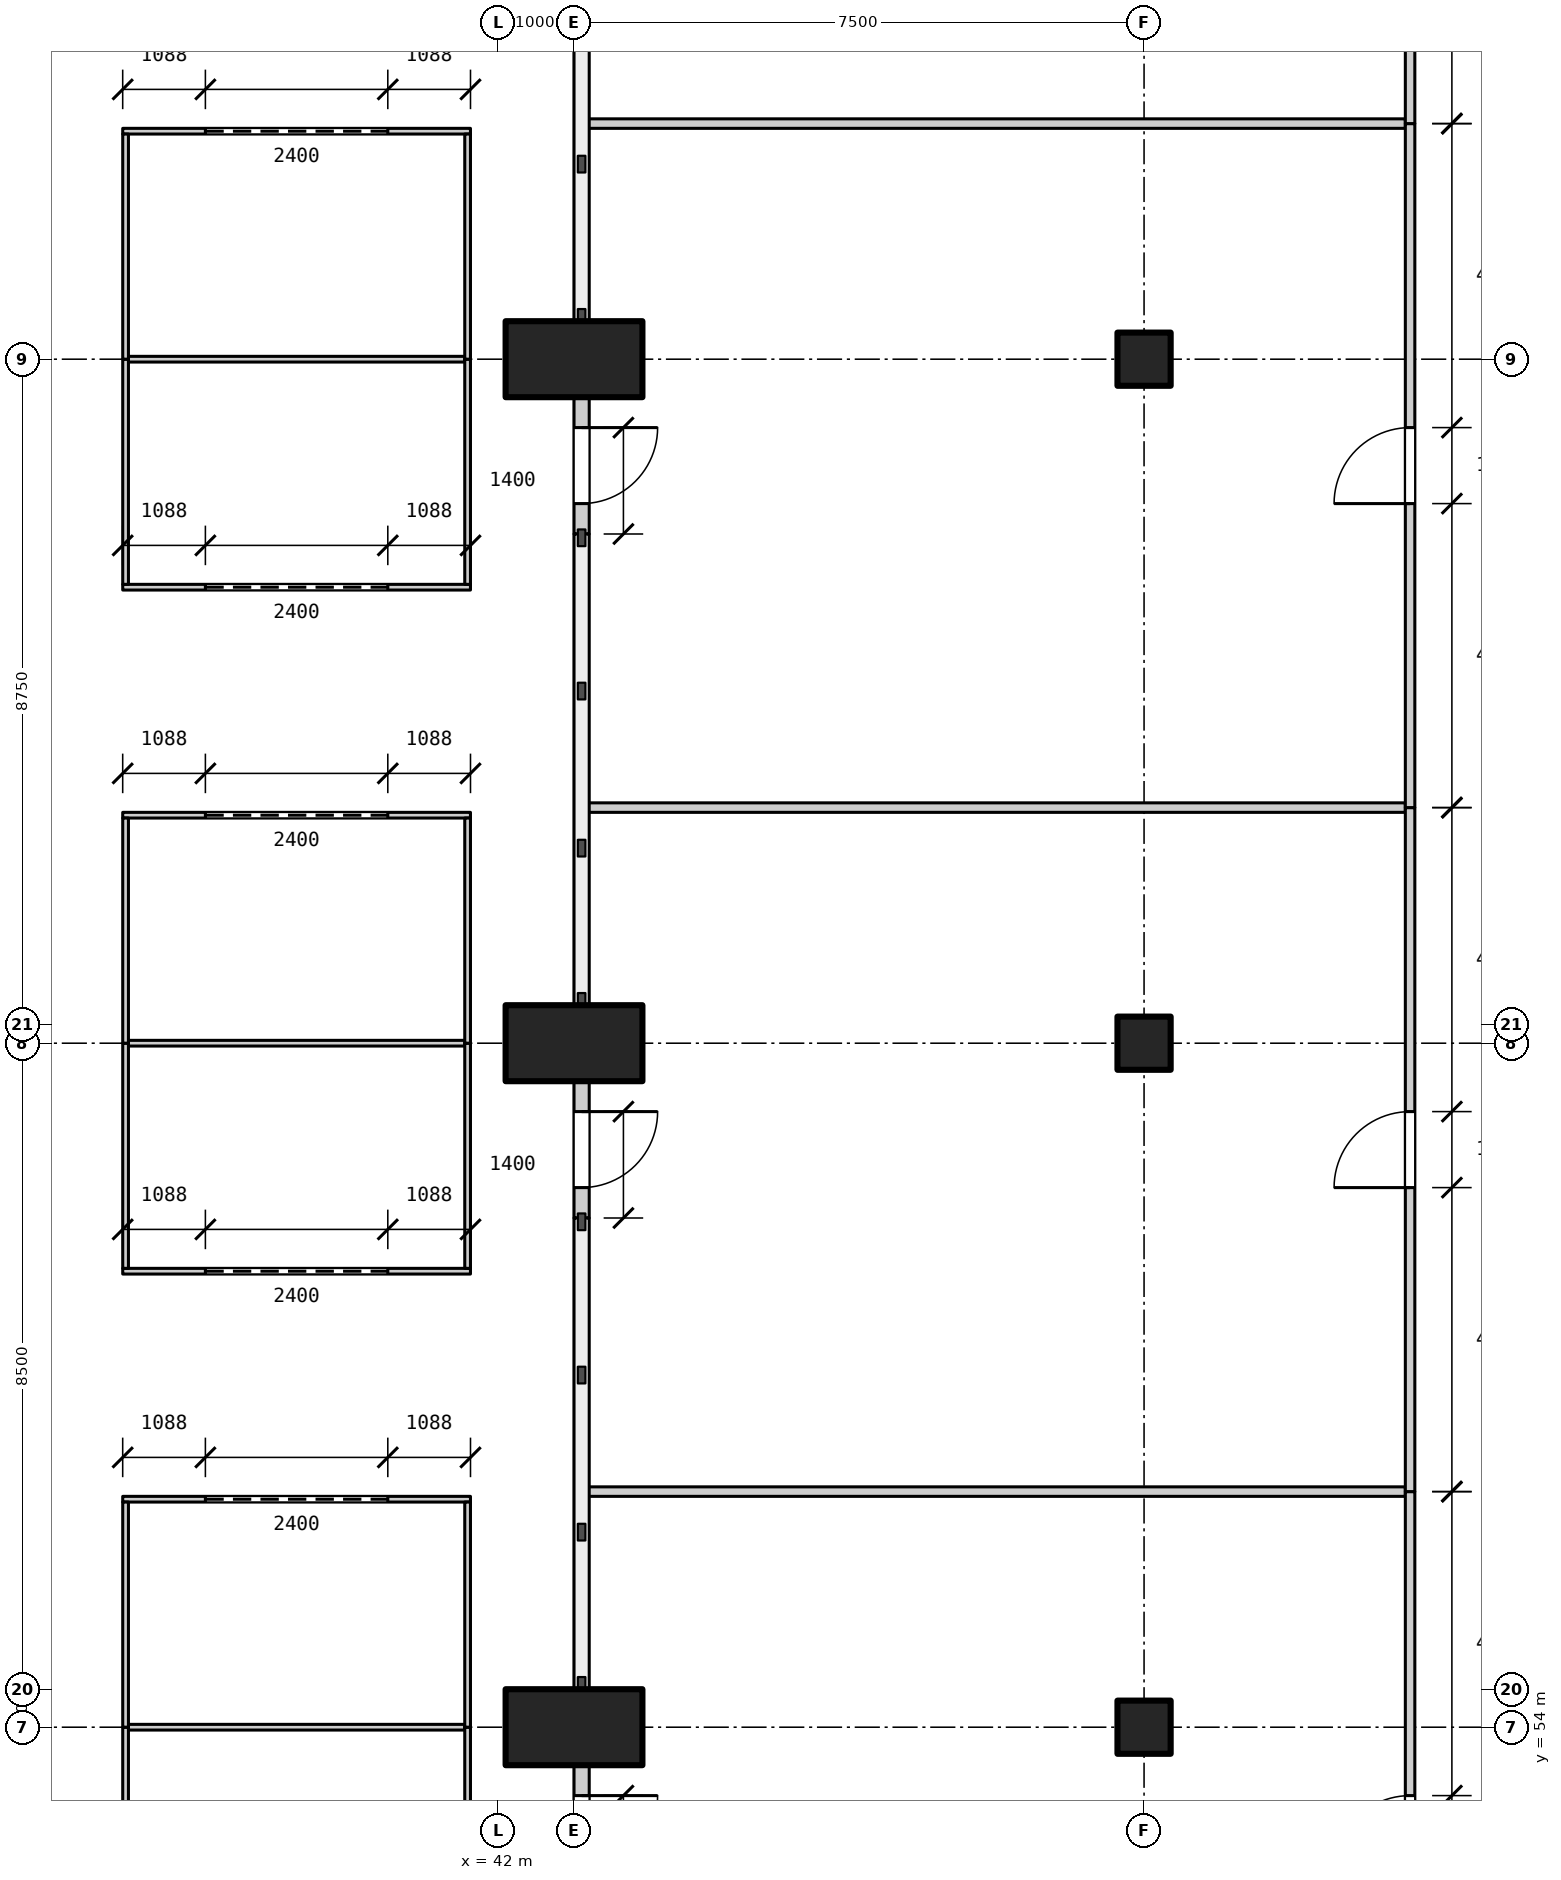
"""IFC4 building model, lengths in metres.
Left out: names, types, materials, properties, quantities, classifications, styles, units other than length and angle.
Written with IfcOpenShell. Run it as: python <this file> out.ifc"""

import sys

from ifc_helpers import new_model, si_unit, direction, frame, frame_2d, origin, origin_2d, place, context, subcontext, project, spatial, rectangle, extrude, element, fill, save


model = new_model("IFC4")
c1 = context("Model", 3, precision=1e-05, world=origin(), true_north=direction((0.0, 1.0)))
c2 = subcontext(c1, "Body", "Model", "MODEL_VIEW")
j1 = project(units=[si_unit("LENGTHUNIT", "METRE"), si_unit("PLANEANGLEUNIT", "RADIAN")], contexts=[c1])
p1 = place(None, origin())
s1 = spatial("IfcSite", under=j1, at=p1, CompositionType="ELEMENT")
p2 = place(p1, origin())
s2 = spatial("IfcBuilding", under=s1, at=p2, CompositionType="ELEMENT")
p3 = place(p2, origin())
s3 = spatial("IfcBuildingStorey", under=s2, at=p3, CompositionType="ELEMENT", Elevation=0.0)
for number, where, z_axis, x_axis in (
    (1, (50.5, 54.0, 0.0), (0.0, 0.0, 1.0), (1.0, 0.0, 0.0)),
    (2, (50.5, 63.0, 0.0), (0.0, 0.0, 1.0), (1.0, 0.0, 0.0)),
    (3, (50.5, 72.0, 0.0), (0.0, 0.0, 1.0), (1.0, 0.0, 0.0)),
):
    element("IfcColumn", number, at=place(p3, frame(where, z_axis=z_axis, x_axis=x_axis)), inside=s3, PredefinedType="COLUMN", context=c2, shape_type="SweptSolid", body=[
        extrude(rectangle(XDim=0.7, YDim=0.7, at=origin_2d()), origin(), (0.0, 0.0, 1.0), 6.0),
    ])
for number, where, z_axis, x_axis in (
    (4, (43.0, 54.0, 0.0), (0.0, 0.0, 1.0), (1.0, 0.0, 0.0)),
    (5, (43.0, 63.0, 0.0), (0.0, 0.0, 1.0), (1.0, 0.0, 0.0)),
    (6, (43.0, 72.0, 0.0), (0.0, 0.0, 1.0), (1.0, 0.0, 0.0)),
):
    element("IfcColumn", number, at=place(p3, frame(where, z_axis=z_axis, x_axis=x_axis)), inside=s3, PredefinedType="COLUMN", context=c2, shape_type="SweptSolid", body=[
        extrude(rectangle(XDim=1.8, YDim=1.0, at=origin_2d()), origin(), (0.0, 0.0, 1.0), 6.0),
    ])
p4 = place(p3, frame((43.1, 51.7, 0.0), z_axis=(0.0, 0.0, 1.0), x_axis=(0.0, 1.0, 0.0)))
e7 = element("IfcWall", 7, at=p4, inside=s3, PredefinedType="PARTITIONING", context=c2, shape_type="SweptSolid", body=[
    extrude(rectangle(XDim=1.8, YDim=0.2, at=frame_2d((0.9, 0.0))), origin(), (0.0, 0.0, 1.0), 5.8),
])
p5 = place(p4, frame((0.4, 0.0, 0.0)))
e8 = element("IfcOpeningElement", 8, at=p5, cuts=e7, PredefinedType="OPENING", context=c2, shape_type="SweptSolid", body=[
    extrude(rectangle(XDim=1.0, YDim=2.4, at=frame_2d((0.5, 1.2))), frame((0.0, 0.11, 0.0), z_axis=(0.0, -1.0, 0.0), x_axis=(1.0, 0.0, 0.0)), (0.0, 0.0, 1.0), 0.22),
])
p6 = place(p3, frame((43.1, 60.7, 0.0), z_axis=(0.0, 0.0, 1.0), x_axis=(0.0, 1.0, 0.0)))
e9 = element("IfcWall", 9, at=p6, inside=s3, PredefinedType="PARTITIONING", context=c2, shape_type="SweptSolid", body=[
    extrude(rectangle(XDim=1.8, YDim=0.2, at=frame_2d((0.9, 0.0))), origin(), (0.0, 0.0, 1.0), 5.8),
])
p7 = place(p6, frame((0.4, 0.0, 0.0)))
e10 = element("IfcOpeningElement", 10, at=p7, cuts=e9, PredefinedType="OPENING", context=c2, shape_type="SweptSolid", body=[
    extrude(rectangle(XDim=1.0, YDim=2.4, at=frame_2d((0.5, 1.2))), frame((0.0, 0.11, 0.0), z_axis=(0.0, -1.0, 0.0), x_axis=(1.0, 0.0, 0.0)), (0.0, 0.0, 1.0), 0.22),
])
p8 = place(p3, frame((43.1, 69.7, 0.0), z_axis=(0.0, 0.0, 1.0), x_axis=(0.0, 1.0, 0.0)))
e11 = element("IfcWall", 11, at=p8, inside=s3, PredefinedType="PARTITIONING", context=c2, shape_type="SweptSolid", body=[
    extrude(rectangle(XDim=1.8, YDim=0.2, at=frame_2d((0.9, 0.0))), origin(), (0.0, 0.0, 1.0), 5.8),
])
p9 = place(p8, frame((0.4, 0.0, 0.0)))
e12 = element("IfcOpeningElement", 12, at=p9, cuts=e11, PredefinedType="OPENING", context=c2, shape_type="SweptSolid", body=[
    extrude(rectangle(XDim=1.0, YDim=2.4, at=frame_2d((0.5, 1.2))), frame((0.0, 0.11, 0.0), z_axis=(0.0, -1.0, 0.0), x_axis=(1.0, 0.0, 0.0)), (0.0, 0.0, 1.0), 0.22),
])
p10 = place(p3, frame((37.137, 54.0, 0.0), z_axis=(0.0, 0.0, 1.0), x_axis=(1.0, 0.0, 0.0)))
e13 = element("IfcWall", 13, at=p10, inside=s3, PredefinedType="PARTITIONING", context=c2, shape_type="SweptSolid", body=[
    extrude(rectangle(XDim=4.425, YDim=0.075, at=frame_2d((2.212, 0.0))), origin(), (0.0, 0.0, 1.0), 3.0),
])
p11 = place(p3, frame((37.062, 57.0, 0.0), z_axis=(0.0, 0.0, 1.0), x_axis=(1.0, 0.0, 0.0)))
e14 = element("IfcWall", 14, at=p11, inside=s3, PredefinedType="PARTITIONING", context=c2, shape_type="SweptSolid", body=[
    extrude(rectangle(XDim=4.575, YDim=0.075, at=frame_2d((2.288, 0.0))), origin(), (0.0, 0.0, 1.0), 3.0),
])
p12 = place(p11, frame((1.087, 0.0, 0.0)))
e15 = element("IfcOpeningElement", 15, at=p12, cuts=e14, PredefinedType="OPENING", context=c2, shape_type="SweptSolid", body=[
    extrude(rectangle(XDim=2.4, YDim=2.4, at=frame_2d((1.2, 1.2))), frame((0.0, 0.047, 0.0), z_axis=(0.0, -1.0, 0.0), x_axis=(1.0, 0.0, 0.0)), (0.0, 0.0, 1.0), 0.095),
])
p13 = place(p3, frame((43.1, 57.1, 0.0), z_axis=(0.0, 0.0, 1.0), x_axis=(1.0, 0.0, 0.0)))
e16 = element("IfcWall", 16, at=p13, inside=s3, PredefinedType="PARTITIONING", context=c2, shape_type="SweptSolid", body=[
    extrude(rectangle(XDim=10.837, YDim=0.125, at=frame_2d((5.419, 0.0))), origin(), (0.0, 0.0, 1.0), 5.8),
])
p14 = place(p3, frame((37.062, 60.0, 0.0), z_axis=(0.0, 0.0, 1.0), x_axis=(1.0, 0.0, 0.0)))
e17 = element("IfcWall", 17, at=p14, inside=s3, PredefinedType="PARTITIONING", context=c2, shape_type="SweptSolid", body=[
    extrude(rectangle(XDim=4.575, YDim=0.075, at=frame_2d((2.288, 0.0))), origin(), (0.0, 0.0, 1.0), 3.0),
])
p15 = place(p14, frame((1.087, 0.0, 0.0)))
e18 = element("IfcOpeningElement", 18, at=p15, cuts=e17, PredefinedType="OPENING", context=c2, shape_type="SweptSolid", body=[
    extrude(rectangle(XDim=2.4, YDim=2.4, at=frame_2d((1.2, 1.2))), frame((0.0, 0.047, 0.0), z_axis=(0.0, -1.0, 0.0), x_axis=(1.0, 0.0, 0.0)), (0.0, 0.0, 1.0), 0.095),
])
p16 = place(p3, frame((37.137, 63.0, 0.0), z_axis=(0.0, 0.0, 1.0), x_axis=(1.0, 0.0, 0.0)))
e19 = element("IfcWall", 19, at=p16, inside=s3, PredefinedType="PARTITIONING", context=c2, shape_type="SweptSolid", body=[
    extrude(rectangle(XDim=4.425, YDim=0.075, at=frame_2d((2.212, 0.0))), origin(), (0.0, 0.0, 1.0), 3.0),
])
p17 = place(p3, frame((37.062, 66.0, 0.0), z_axis=(0.0, 0.0, 1.0), x_axis=(1.0, 0.0, 0.0)))
e20 = element("IfcWall", 20, at=p17, inside=s3, PredefinedType="PARTITIONING", context=c2, shape_type="SweptSolid", body=[
    extrude(rectangle(XDim=4.575, YDim=0.075, at=frame_2d((2.288, 0.0))), origin(), (0.0, 0.0, 1.0), 3.0),
])
p18 = place(p17, frame((1.087, 0.0, 0.0)))
e21 = element("IfcOpeningElement", 21, at=p18, cuts=e20, PredefinedType="OPENING", context=c2, shape_type="SweptSolid", body=[
    extrude(rectangle(XDim=2.4, YDim=2.4, at=frame_2d((1.2, 1.2))), frame((0.0, 0.047, 0.0), z_axis=(0.0, -1.0, 0.0), x_axis=(1.0, 0.0, 0.0)), (0.0, 0.0, 1.0), 0.095),
])
p19 = place(p3, frame((43.1, 66.1, 0.0), z_axis=(0.0, 0.0, 1.0), x_axis=(1.0, 0.0, 0.0)))
e22 = element("IfcWall", 22, at=p19, inside=s3, PredefinedType="PARTITIONING", context=c2, shape_type="SweptSolid", body=[
    extrude(rectangle(XDim=10.837, YDim=0.125, at=frame_2d((5.419, 0.0))), origin(), (0.0, 0.0, 1.0), 5.8),
])
p20 = place(p3, frame((37.062, 69.0, 0.0), z_axis=(0.0, 0.0, 1.0), x_axis=(1.0, 0.0, 0.0)))
e23 = element("IfcWall", 23, at=p20, inside=s3, PredefinedType="PARTITIONING", context=c2, shape_type="SweptSolid", body=[
    extrude(rectangle(XDim=4.575, YDim=0.075, at=frame_2d((2.288, 0.0))), origin(), (0.0, 0.0, 1.0), 3.0),
])
p21 = place(p20, frame((1.087, 0.0, 0.0)))
e24 = element("IfcOpeningElement", 24, at=p21, cuts=e23, PredefinedType="OPENING", context=c2, shape_type="SweptSolid", body=[
    extrude(rectangle(XDim=2.4, YDim=2.4, at=frame_2d((1.2, 1.2))), frame((0.0, 0.047, 0.0), z_axis=(0.0, -1.0, 0.0), x_axis=(1.0, 0.0, 0.0)), (0.0, 0.0, 1.0), 0.095),
])
p22 = place(p3, frame((37.137, 72.0, 0.0), z_axis=(0.0, 0.0, 1.0), x_axis=(1.0, 0.0, 0.0)))
e25 = element("IfcWall", 25, at=p22, inside=s3, PredefinedType="PARTITIONING", context=c2, shape_type="SweptSolid", body=[
    extrude(rectangle(XDim=4.425, YDim=0.075, at=frame_2d((2.212, 0.0))), origin(), (0.0, 0.0, 1.0), 3.0),
])
p23 = place(p3, frame((37.062, 75.0, 0.0), z_axis=(0.0, 0.0, 1.0), x_axis=(1.0, 0.0, 0.0)))
e26 = element("IfcWall", 26, at=p23, inside=s3, PredefinedType="PARTITIONING", context=c2, shape_type="SweptSolid", body=[
    extrude(rectangle(XDim=4.575, YDim=0.075, at=frame_2d((2.288, 0.0))), origin(), (0.0, 0.0, 1.0), 3.0),
])
p24 = place(p23, frame((1.087, 0.0, 0.0)))
e27 = element("IfcOpeningElement", 27, at=p24, cuts=e26, PredefinedType="OPENING", context=c2, shape_type="SweptSolid", body=[
    extrude(rectangle(XDim=2.4, YDim=2.4, at=frame_2d((1.2, 1.2))), frame((0.0, 0.047, 0.0), z_axis=(0.0, -1.0, 0.0), x_axis=(1.0, 0.0, 0.0)), (0.0, 0.0, 1.0), 0.095),
])
p25 = place(p3, frame((43.1, 75.1, 0.0), z_axis=(0.0, 0.0, 1.0), x_axis=(1.0, 0.0, 0.0)))
e28 = element("IfcWall", 28, at=p25, inside=s3, PredefinedType="PARTITIONING", context=c2, shape_type="SweptSolid", body=[
    extrude(rectangle(XDim=10.837, YDim=0.125, at=frame_2d((5.419, 0.0))), origin(), (0.0, 0.0, 1.0), 5.8),
])
for number, where, z_axis, x_axis in (
    (29, (37.1, 51.038, 0.0), (0.0, 0.0, 1.0), (0.0, 1.0, 0.0)),
    (30, (37.1, 54.0, 0.0), (0.0, 0.0, 1.0), (0.0, 1.0, 0.0)),
    (31, (37.1, 60.038, 0.0), (0.0, 0.0, 1.0), (0.0, 1.0, 0.0)),
    (32, (37.1, 63.0, 0.0), (0.0, 0.0, 1.0), (0.0, 1.0, 0.0)),
    (33, (37.1, 69.038, 0.0), (0.0, 0.0, 1.0), (0.0, 1.0, 0.0)),
    (34, (37.1, 72.0, 0.0), (0.0, 0.0, 1.0), (0.0, 1.0, 0.0)),
    (35, (41.6, 51.038, 0.0), (0.0, 0.0, 1.0), (0.0, 1.0, 0.0)),
    (36, (41.6, 54.0, 0.0), (0.0, 0.0, 1.0), (0.0, 1.0, 0.0)),
    (37, (41.6, 60.038, 0.0), (0.0, 0.0, 1.0), (0.0, 1.0, 0.0)),
    (38, (41.6, 63.0, 0.0), (0.0, 0.0, 1.0), (0.0, 1.0, 0.0)),
    (39, (41.6, 69.038, 0.0), (0.0, 0.0, 1.0), (0.0, 1.0, 0.0)),
    (40, (41.6, 72.0, 0.0), (0.0, 0.0, 1.0), (0.0, 1.0, 0.0)),
):
    element("IfcWall", number, at=place(p3, frame(where, z_axis=z_axis, x_axis=x_axis)), inside=s3, PredefinedType="PARTITIONING", context=c2, shape_type="SweptSolid", body=[
        extrude(rectangle(XDim=2.962, YDim=0.075, at=frame_2d((1.481, 0.0))), origin(), (0.0, 0.0, 1.0), 3.0),
    ])
p26 = place(p3, frame((54.0, 48.1, 0.0), z_axis=(0.0, 0.0, 1.0), x_axis=(0.0, 1.0, 0.0)))
e41 = element("IfcWall", 41, at=p26, inside=s3, PredefinedType="PARTITIONING", context=c2, shape_type="SweptSolid", body=[
    extrude(rectangle(XDim=9.0, YDim=0.125, at=frame_2d((4.5, 0.0))), origin(), (0.0, 0.0, 1.0), 5.05),
])
p27 = place(p26, frame((4.0, 0.0, 0.0)))
e42 = element("IfcOpeningElement", 42, at=p27, cuts=e41, PredefinedType="OPENING", context=c2, shape_type="SweptSolid", body=[
    extrude(rectangle(XDim=1.0, YDim=2.1, at=frame_2d((0.5, 1.05))), frame((0.0, 0.073, 0.0), z_axis=(0.0, -1.0, 0.0), x_axis=(1.0, 0.0, 0.0)), (0.0, 0.0, 1.0), 0.145),
])
p28 = place(p3, frame((54.0, 57.1, 0.0), z_axis=(0.0, 0.0, 1.0), x_axis=(0.0, 1.0, 0.0)))
e43 = element("IfcWall", 43, at=p28, inside=s3, PredefinedType="PARTITIONING", context=c2, shape_type="SweptSolid", body=[
    extrude(rectangle(XDim=9.0, YDim=0.125, at=frame_2d((4.5, 0.0))), origin(), (0.0, 0.0, 1.0), 5.05),
])
p29 = place(p28, frame((4.0, 0.0, 0.0)))
e44 = element("IfcOpeningElement", 44, at=p29, cuts=e43, PredefinedType="OPENING", context=c2, shape_type="SweptSolid", body=[
    extrude(rectangle(XDim=1.0, YDim=2.1, at=frame_2d((0.5, 1.05))), frame((0.0, 0.073, 0.0), z_axis=(0.0, -1.0, 0.0), x_axis=(1.0, 0.0, 0.0)), (0.0, 0.0, 1.0), 0.145),
])
p30 = place(p3, frame((54.0, 66.1, 0.0), z_axis=(0.0, 0.0, 1.0), x_axis=(0.0, 1.0, 0.0)))
e45 = element("IfcWall", 45, at=p30, inside=s3, PredefinedType="PARTITIONING", context=c2, shape_type="SweptSolid", body=[
    extrude(rectangle(XDim=9.0, YDim=0.125, at=frame_2d((4.5, 0.0))), origin(), (0.0, 0.0, 1.0), 5.05),
])
p31 = place(p30, frame((4.0, 0.0, 0.0)))
e46 = element("IfcOpeningElement", 46, at=p31, cuts=e45, PredefinedType="OPENING", context=c2, shape_type="SweptSolid", body=[
    extrude(rectangle(XDim=1.0, YDim=2.1, at=frame_2d((0.5, 1.05))), frame((0.0, 0.073, 0.0), z_axis=(0.0, -1.0, 0.0), x_axis=(1.0, 0.0, 0.0)), (0.0, 0.0, 1.0), 0.145),
])
p32 = place(p3, frame((54.0, 75.1, 0.0), z_axis=(0.0, 0.0, 1.0), x_axis=(0.0, 1.0, 0.0)))
e47 = element("IfcWall", 47, at=p32, inside=s3, PredefinedType="PARTITIONING", context=c2, shape_type="SweptSolid", body=[
    extrude(rectangle(XDim=9.0, YDim=0.125, at=frame_2d((4.5, 0.0))), origin(), (0.0, 0.0, 1.0), 5.05),
])
p33 = place(p32, frame((4.0, 0.0, 0.0)))
e48 = element("IfcOpeningElement", 48, at=p33, cuts=e47, PredefinedType="OPENING", context=c2, shape_type="SweptSolid", body=[
    extrude(rectangle(XDim=1.0, YDim=2.1, at=frame_2d((0.5, 1.05))), frame((0.0, 0.073, 0.0), z_axis=(0.0, -1.0, 0.0), x_axis=(1.0, 0.0, 0.0)), (0.0, 0.0, 1.0), 0.145),
])
p34 = place(p5, frame((1.0, 0.0, 0.0), z_axis=(0.0, 0.0, 1.0), x_axis=(-1.0, 0.0, 0.0)))
e49 = element("IfcDoor", 49, at=p34, inside=s3, OperationType="SINGLE_SWING_LEFT", PredefinedType="DOOR", context=c2, shape_type="SweptSolid", body=[
    extrude(rectangle(XDim=1.0, YDim=2.4, at=frame_2d((0.5, 1.2))), frame((0.0, 0.025, 0.0), z_axis=(0.0, -1.0, 0.0), x_axis=(1.0, 0.0, 0.0)), (0.0, 0.0, 1.0), 0.05),
])
fill(e8, e49)
p35 = place(p7, frame((1.0, 0.0, 0.0), z_axis=(0.0, 0.0, 1.0), x_axis=(-1.0, 0.0, 0.0)))
e50 = element("IfcDoor", 50, at=p35, inside=s3, OperationType="SINGLE_SWING_LEFT", PredefinedType="DOOR", context=c2, shape_type="SweptSolid", body=[
    extrude(rectangle(XDim=1.0, YDim=2.4, at=frame_2d((0.5, 1.2))), frame((0.0, 0.025, 0.0), z_axis=(0.0, -1.0, 0.0), x_axis=(1.0, 0.0, 0.0)), (0.0, 0.0, 1.0), 0.05),
])
fill(e10, e50)
p36 = place(p9, frame((1.0, 0.0, 0.0), z_axis=(0.0, 0.0, 1.0), x_axis=(-1.0, 0.0, 0.0)))
e51 = element("IfcDoor", 51, at=p36, inside=s3, OperationType="SINGLE_SWING_LEFT", PredefinedType="DOOR", context=c2, shape_type="SweptSolid", body=[
    extrude(rectangle(XDim=1.0, YDim=2.4, at=frame_2d((0.5, 1.2))), frame((0.0, 0.025, 0.0), z_axis=(0.0, -1.0, 0.0), x_axis=(1.0, 0.0, 0.0)), (0.0, 0.0, 1.0), 0.05),
])
fill(e12, e51)
p37 = place(p27, origin())
e52 = element("IfcDoor", 52, at=p37, inside=s3, OperationType="SINGLE_SWING_LEFT", PredefinedType="DOOR", context=c2, shape_type="SweptSolid", body=[
    extrude(rectangle(XDim=1.0, YDim=2.1, at=frame_2d((0.5, 1.05))), frame((0.0, 0.025, 0.0), z_axis=(0.0, -1.0, 0.0), x_axis=(1.0, 0.0, 0.0)), (0.0, 0.0, 1.0), 0.05),
])
fill(e42, e52)
p38 = place(p12, origin())
e53 = element("IfcDoor", 53, at=p38, inside=s3, OperationType="ROLLINGUP", PredefinedType="DOOR", context=c2, shape_type="SweptSolid", body=[
    extrude(rectangle(XDim=2.4, YDim=2.4, at=frame_2d((1.2, 1.2))), frame((0.0, 0.025, 0.0), z_axis=(0.0, -1.0, 0.0), x_axis=(1.0, 0.0, 0.0)), (0.0, 0.0, 1.0), 0.05),
])
fill(e15, e53)
p39 = place(p15, origin())
e54 = element("IfcDoor", 54, at=p39, inside=s3, OperationType="ROLLINGUP", PredefinedType="DOOR", context=c2, shape_type="SweptSolid", body=[
    extrude(rectangle(XDim=2.4, YDim=2.4, at=frame_2d((1.2, 1.2))), frame((0.0, 0.025, 0.0), z_axis=(0.0, -1.0, 0.0), x_axis=(1.0, 0.0, 0.0)), (0.0, 0.0, 1.0), 0.05),
])
fill(e18, e54)
p40 = place(p29, origin())
e55 = element("IfcDoor", 55, at=p40, inside=s3, OperationType="SINGLE_SWING_LEFT", PredefinedType="DOOR", context=c2, shape_type="SweptSolid", body=[
    extrude(rectangle(XDim=1.0, YDim=2.1, at=frame_2d((0.5, 1.05))), frame((0.0, 0.025, 0.0), z_axis=(0.0, -1.0, 0.0), x_axis=(1.0, 0.0, 0.0)), (0.0, 0.0, 1.0), 0.05),
])
fill(e44, e55)
p41 = place(p18, origin())
e56 = element("IfcDoor", 56, at=p41, inside=s3, OperationType="ROLLINGUP", PredefinedType="DOOR", context=c2, shape_type="SweptSolid", body=[
    extrude(rectangle(XDim=2.4, YDim=2.4, at=frame_2d((1.2, 1.2))), frame((0.0, 0.025, 0.0), z_axis=(0.0, -1.0, 0.0), x_axis=(1.0, 0.0, 0.0)), (0.0, 0.0, 1.0), 0.05),
])
fill(e21, e56)
p42 = place(p21, origin())
e57 = element("IfcDoor", 57, at=p42, inside=s3, OperationType="ROLLINGUP", PredefinedType="DOOR", context=c2, shape_type="SweptSolid", body=[
    extrude(rectangle(XDim=2.4, YDim=2.4, at=frame_2d((1.2, 1.2))), frame((0.0, 0.025, 0.0), z_axis=(0.0, -1.0, 0.0), x_axis=(1.0, 0.0, 0.0)), (0.0, 0.0, 1.0), 0.05),
])
fill(e24, e57)
p43 = place(p31, origin())
e58 = element("IfcDoor", 58, at=p43, inside=s3, OperationType="SINGLE_SWING_LEFT", PredefinedType="DOOR", context=c2, shape_type="SweptSolid", body=[
    extrude(rectangle(XDim=1.0, YDim=2.1, at=frame_2d((0.5, 1.05))), frame((0.0, 0.025, 0.0), z_axis=(0.0, -1.0, 0.0), x_axis=(1.0, 0.0, 0.0)), (0.0, 0.0, 1.0), 0.05),
])
fill(e46, e58)
p44 = place(p24, origin())
e59 = element("IfcDoor", 59, at=p44, inside=s3, OperationType="ROLLINGUP", PredefinedType="DOOR", context=c2, shape_type="SweptSolid", body=[
    extrude(rectangle(XDim=2.4, YDim=2.4, at=frame_2d((1.2, 1.2))), frame((0.0, 0.025, 0.0), z_axis=(0.0, -1.0, 0.0), x_axis=(1.0, 0.0, 0.0)), (0.0, 0.0, 1.0), 0.05),
])
fill(e27, e59)
save(model, sys.argv[1])
